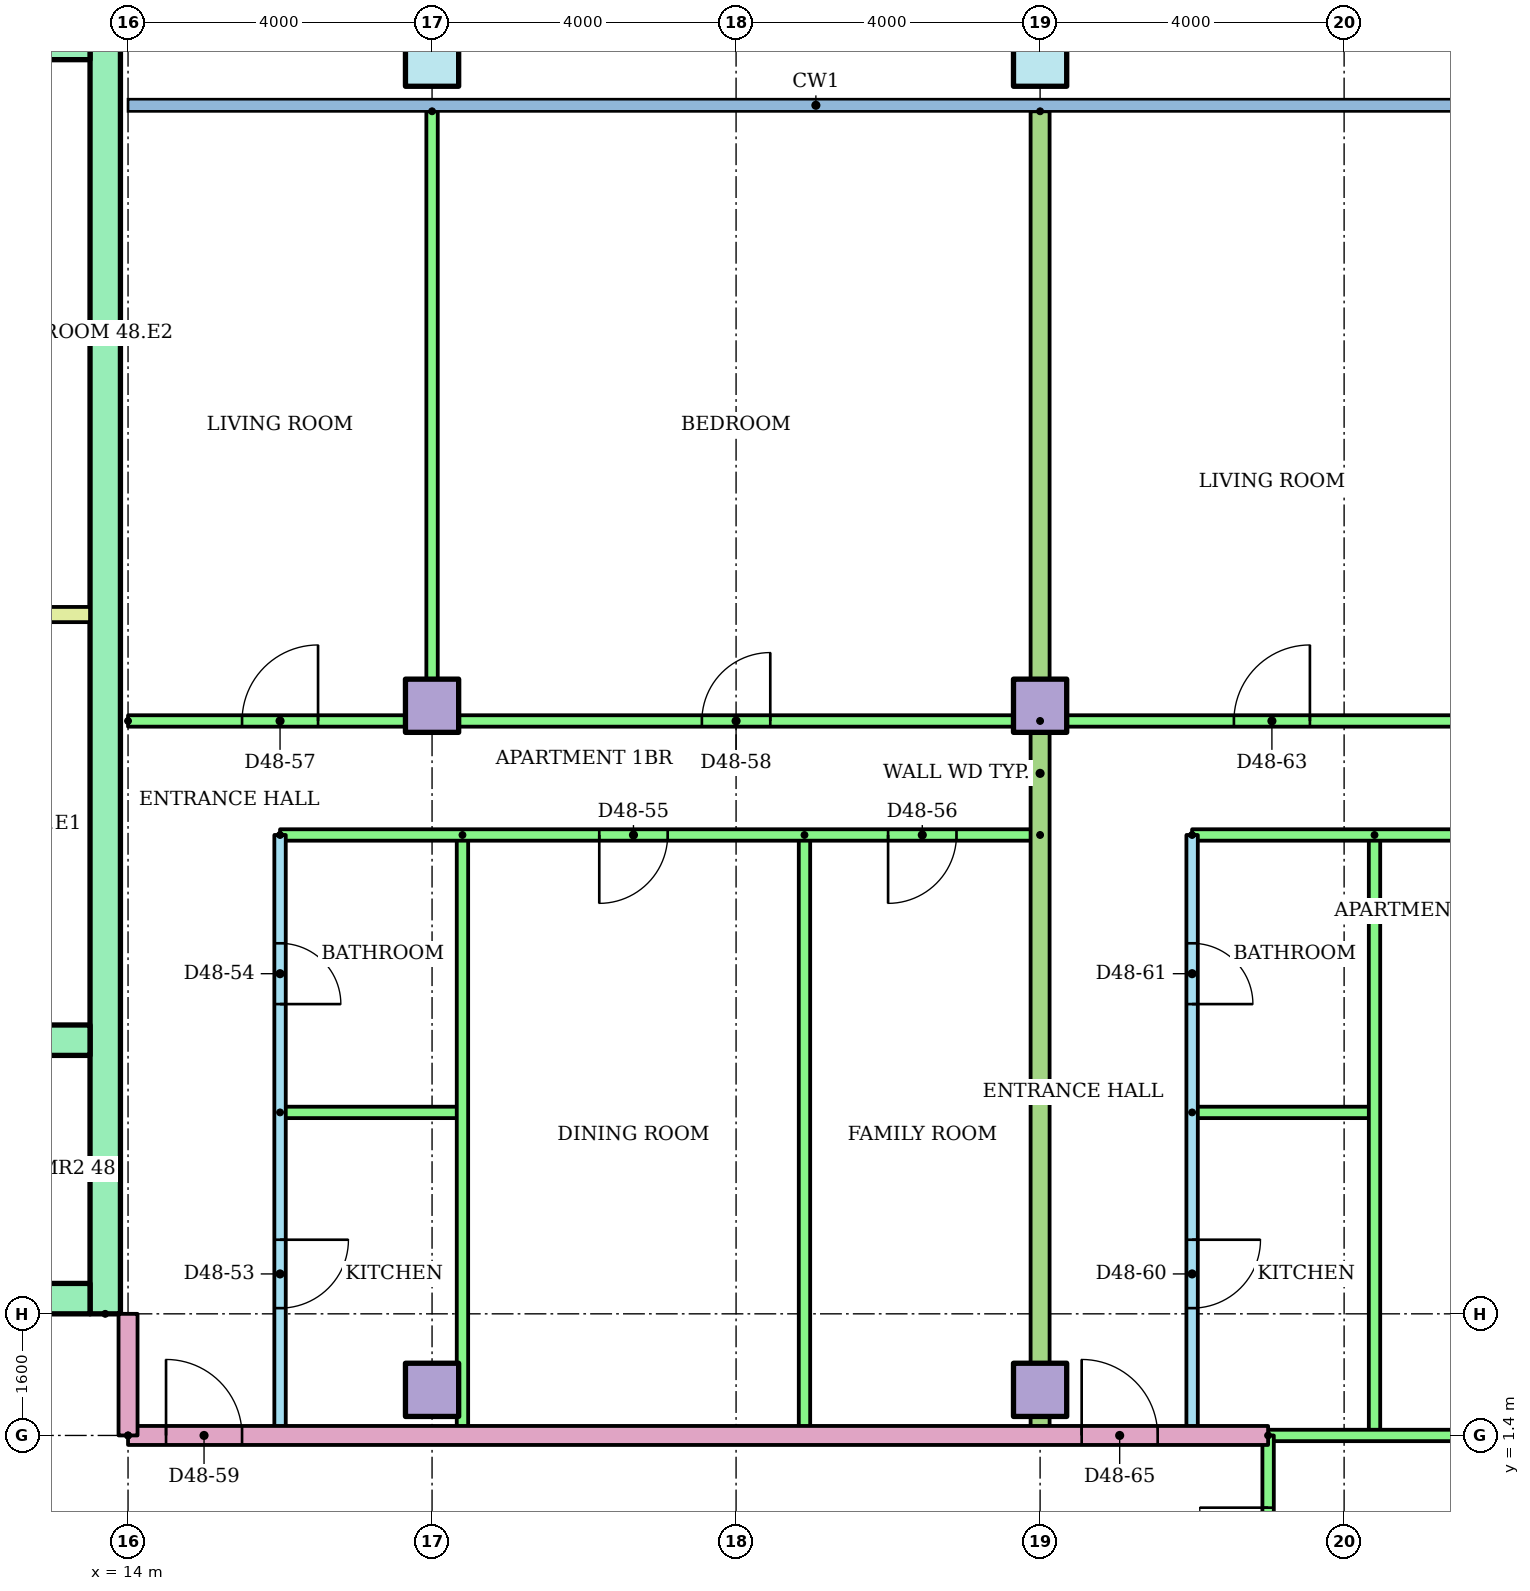
"""IFC4 building model, lengths in metres.
Left out: names, types, materials, properties, quantities, classifications, styles, units other than length and angle.
Written with IfcOpenShell. Run it as: python <this file> out.ifc"""

import sys

from ifc_helpers import new_model, si_unit, direction, frame, frame_2d, origin, origin_2d, place, context, subcontext, project, spatial, rectangle, hollow_rectangle, extrude, element, fill, save


model = new_model("IFC4")
c1 = context("Model", 3, precision=1e-05, world=origin(), true_north=direction((0.0, 1.0)))
c2 = subcontext(c1, "Body", "Model", "MODEL_VIEW")
j1 = project(units=[si_unit("LENGTHUNIT", "METRE"), si_unit("PLANEANGLEUNIT", "RADIAN")], contexts=[c1])
p1 = place(None, origin())
s1 = spatial("IfcSite", under=j1, at=p1, CompositionType="ELEMENT")
p2 = place(p1, origin())
s2 = spatial("IfcBuilding", under=s1, at=p2, CompositionType="ELEMENT")
p3 = place(p2, frame((0.0, 0.0, 184.5)))
s3 = spatial("IfcBuildingStorey", under=s2, at=p3, CompositionType="ELEMENT", Elevation=184.5)
for number, where in (
    (1, (18.0, 2.0, 0.0)),
    (2, (26.0, 2.0, 0.0)),
    (3, (18.0, 11.0, 0.0)),
    (4, (26.0, 11.0, 0.0)),
):
    element("IfcColumn", number, at=place(p3, frame(where)), inside=s3, PredefinedType="COLUMN", context=c2, shape_type="SweptSolid", body=[
        extrude(rectangle(XDim=0.7, YDim=0.7, at=origin_2d()), origin(), (0.0, 0.0, 1.0), 3.2),
    ])
for number, where in (
    (5, (18.0, 19.5, 0.0)),
    (6, (26.0, 19.5, 0.0)),
):
    element("IfcColumn", number, at=place(p3, frame(where)), inside=s3, PredefinedType="COLUMN", context=c2, shape_type="SweptSolid", body=[
        extrude(hollow_rectangle(XDim=0.7, YDim=0.7, WallThickness=0.036, at=origin_2d()), origin(), (0.0, 0.0, 1.0), 3.2),
    ])
p4 = place(p3, frame((13.7, 3.0, 0.0), z_axis=(0.0, 0.0, 1.0), x_axis=(0.0, 1.0, 0.0)))
e7 = element("IfcWall", 7, at=p4, inside=s3, PredefinedType="SHEAR", context=c2, shape_type="SweptSolid", body=[
    extrude(rectangle(XDim=17.0, YDim=0.4, at=frame_2d((8.5, 0.0))), origin(), (0.0, 0.0, 1.0), 2.92),
])
p5 = place(p3, frame((-13.5, 19.7, 0.0)))
e8 = element("IfcWall", 8, at=p5, inside=s3, PredefinedType="SHEAR", context=c2, shape_type="SweptSolid", body=[
    extrude(rectangle(XDim=27.0, YDim=0.4, at=frame_2d((13.5, 0.0))), origin(), (0.0, 0.0, 1.0), 2.92),
])
p6 = place(p3, frame((-13.5, 3.2, 0.0)))
e9 = element("IfcWall", 9, at=p6, inside=s3, PredefinedType="SHEAR", context=c2, shape_type="SweptSolid", body=[
    extrude(rectangle(XDim=27.0, YDim=0.4, at=frame_2d((13.5, 0.0))), origin(), (0.0, 0.0, 1.0), 2.92),
])
p7 = place(p6, frame((22.083, 0.0, 0.0)))
e10 = element("IfcOpeningElement", 10, at=p7, cuts=e9, PredefinedType="OPENING", context=c2, shape_type="SweptSolid", body=[
    extrude(rectangle(XDim=1.1, YDim=2.1, at=frame_2d((0.55, 1.05))), frame((0.0, 0.21, 0.0), z_axis=(0.0, -1.0, 0.0), x_axis=(1.0, 0.0, 0.0)), (0.0, 0.0, 1.0), 0.42),
])
p8 = place(p6, frame((25.128, 0.0, 0.0)))
e11 = element("IfcOpeningElement", 11, at=p8, cuts=e9, PredefinedType="OPENING", context=c2, shape_type="SweptSolid", body=[
    extrude(rectangle(XDim=1.1, YDim=2.1, at=frame_2d((0.55, 1.05))), frame((0.0, 0.21, 0.0), z_axis=(0.0, -1.0, 0.0), x_axis=(1.0, 0.0, 0.0)), (0.0, 0.0, 1.0), 0.42),
])
p9 = place(p6, frame((12.6, 0.0, 0.0)))
e12 = element("IfcOpeningElement", 12, at=p9, cuts=e9, PredefinedType="OPENING", context=c2, shape_type="SweptSolid", body=[
    extrude(rectangle(XDim=1.8, YDim=2.1, at=frame_2d((0.9, 1.05))), frame((0.0, 0.21, 0.0), z_axis=(0.0, -1.0, 0.0), x_axis=(1.0, 0.0, 0.0)), (0.0, 0.0, 1.0), 0.42),
])
p10 = place(p3, frame((1.522, 6.6, 0.0)))
e13 = element("IfcWall", 13, at=p10, inside=s3, PredefinedType="SHEAR", context=c2, shape_type="SweptSolid", body=[
    extrude(rectangle(XDim=11.978, YDim=0.4, at=frame_2d((5.989, 0.0))), origin(), (0.0, 0.0, 1.0), 2.92),
])
p11 = place(p10, frame((2.544, 0.0, 0.0)))
e14 = element("IfcOpeningElement", 14, at=p11, cuts=e13, PredefinedType="OPENING", context=c2, shape_type="SweptSolid", body=[
    extrude(rectangle(XDim=1.0, YDim=2.1, at=frame_2d((0.5, 1.05))), frame((0.0, 0.21, 0.0), z_axis=(0.0, -1.0, 0.0), x_axis=(1.0, 0.0, 0.0)), (0.0, 0.0, 1.0), 0.42),
])
p12 = place(p3, frame((9.6, 12.2, 0.0)))
e15 = element("IfcWall", 15, at=p12, inside=s3, PredefinedType="PARTITIONING", context=c2, shape_type="SweptSolid", body=[
    extrude(rectangle(XDim=3.9, YDim=0.2, at=frame_2d((1.95, 0.0))), origin(), (0.0, 0.0, 1.0), 2.92),
])
p13 = place(p3, frame((16.0, 9.3, 0.0), z_axis=(0.0, 0.0, 1.0), x_axis=(0.0, -1.0, 0.0)))
e16 = element("IfcWall", 16, at=p13, inside=s3, PredefinedType="PARTITIONING", context=c2, shape_type="SweptSolid", body=[
    extrude(rectangle(XDim=7.9, YDim=0.15, at=frame_2d((3.95, 0.0))), origin(), (0.0, 0.0, 1.0), 2.4),
])
p14 = place(p13, frame((5.325, 0.0, 0.0)))
e17 = element("IfcOpeningElement", 17, at=p14, cuts=e16, PredefinedType="OPENING", context=c2, shape_type="SweptSolid", body=[
    extrude(rectangle(XDim=0.9, YDim=2.1, at=frame_2d((0.45, 1.05))), frame((0.0, 0.085, 0.0), z_axis=(0.0, -1.0, 0.0), x_axis=(1.0, 0.0, 0.0)), (0.0, 0.0, 1.0), 0.17),
])
p15 = place(p13, frame((1.425, 0.0, 0.0)))
e18 = element("IfcOpeningElement", 18, at=p15, cuts=e16, PredefinedType="OPENING", context=c2, shape_type="SweptSolid", body=[
    extrude(rectangle(XDim=0.8, YDim=2.1, at=frame_2d((0.4, 1.05))), frame((0.0, 0.085, 0.0), z_axis=(0.0, -1.0, 0.0), x_axis=(1.0, 0.0, 0.0)), (0.0, 0.0, 1.0), 0.17),
])
p16 = place(p3, frame((16.0, 5.65, 0.0)))
e19 = element("IfcWall", 19, at=p16, inside=s3, PredefinedType="PARTITIONING", context=c2, shape_type="SweptSolid", body=[
    extrude(rectangle(XDim=2.4, YDim=0.15, at=frame_2d((1.2, 0.0))), origin(), (0.0, 0.0, 1.0), 2.4),
])
for number, where, z_axis, x_axis in (
    (20, (18.4, 9.3, 0.0), (0.0, 0.0, 1.0), (0.0, -1.0, 0.0)),
    (21, (22.9, 9.3, 0.0), (0.0, 0.0, 1.0), (0.0, -1.0, 0.0)),
):
    element("IfcWall", number, at=place(p3, frame(where, z_axis=z_axis, x_axis=x_axis)), inside=s3, PredefinedType="PARTITIONING", context=c2, shape_type="SweptSolid", body=[
        extrude(rectangle(XDim=7.9, YDim=0.15, at=frame_2d((3.95, 0.0))), origin(), (0.0, 0.0, 1.0), 2.4),
    ])
p17 = place(p3, frame((26.0, 9.3, 0.0), z_axis=(0.0, 0.0, 1.0), x_axis=(-1.0, 0.0, 0.0)))
e22 = element("IfcWall", 22, at=p17, inside=s3, PredefinedType="PARTITIONING", context=c2, shape_type="SweptSolid", body=[
    extrude(rectangle(XDim=10.0, YDim=0.15, at=frame_2d((5.0, 0.0))), origin(), (0.0, 0.0, 1.0), 2.4),
])
p18 = place(p17, frame((4.9, 0.0, 0.0)))
e23 = element("IfcOpeningElement", 23, at=p18, cuts=e22, PredefinedType="OPENING", context=c2, shape_type="SweptSolid", body=[
    extrude(rectangle(XDim=0.9, YDim=2.1, at=frame_2d((0.45, 1.05))), frame((0.0, 0.085, 0.0), z_axis=(0.0, -1.0, 0.0), x_axis=(1.0, 0.0, 0.0)), (0.0, 0.0, 1.0), 0.17),
])
p19 = place(p17, frame((1.1, 0.0, 0.0)))
e24 = element("IfcOpeningElement", 24, at=p19, cuts=e22, PredefinedType="OPENING", context=c2, shape_type="SweptSolid", body=[
    extrude(rectangle(XDim=0.9, YDim=2.1, at=frame_2d((0.45, 1.05))), frame((0.0, 0.085, 0.0), z_axis=(0.0, -1.0, 0.0), x_axis=(1.0, 0.0, 0.0)), (0.0, 0.0, 1.0), 0.17),
])
p20 = place(p3, frame((14.0, 10.8, 0.0)))
e25 = element("IfcWall", 25, at=p20, inside=s3, PredefinedType="PARTITIONING", context=c2, shape_type="SweptSolid", body=[
    extrude(rectangle(XDim=12.0, YDim=0.15, at=frame_2d((6.0, 0.0))), origin(), (0.0, 0.0, 1.0), 2.4),
])
p21 = place(p20, frame((1.5, 0.0, 0.0)))
e26 = element("IfcOpeningElement", 26, at=p21, cuts=e25, PredefinedType="OPENING", context=c2, shape_type="SweptSolid", body=[
    extrude(rectangle(XDim=1.0, YDim=2.1, at=frame_2d((0.5, 1.05))), frame((0.0, 0.085, 0.0), z_axis=(0.0, -1.0, 0.0), x_axis=(1.0, 0.0, 0.0)), (0.0, 0.0, 1.0), 0.17),
])
p22 = place(p20, frame((7.55, 0.0, 0.0)))
e27 = element("IfcOpeningElement", 27, at=p22, cuts=e25, PredefinedType="OPENING", context=c2, shape_type="SweptSolid", body=[
    extrude(rectangle(XDim=0.9, YDim=2.1, at=frame_2d((0.45, 1.05))), frame((0.0, 0.085, 0.0), z_axis=(0.0, -1.0, 0.0), x_axis=(1.0, 0.0, 0.0)), (0.0, 0.0, 1.0), 0.17),
])
p23 = place(p3, frame((18.0, 18.821, 0.0), z_axis=(0.0, 0.0, 1.0), x_axis=(0.0, -1.0, 0.0)))
e28 = element("IfcWall", 28, at=p23, inside=s3, PredefinedType="PARTITIONING", context=c2, shape_type="SweptSolid", body=[
    extrude(rectangle(XDim=8.021, YDim=0.15, at=frame_2d((4.01, 0.0))), origin(), (0.0, 0.0, 1.0), 2.4),
])
p24 = place(p3, frame((28.0, 9.3, 0.0), z_axis=(0.0, 0.0, 1.0), x_axis=(0.0, -1.0, 0.0)))
e29 = element("IfcWall", 29, at=p24, inside=s3, PredefinedType="PARTITIONING", context=c2, shape_type="SweptSolid", body=[
    extrude(rectangle(XDim=7.9, YDim=0.15, at=frame_2d((3.95, 0.0))), origin(), (0.0, 0.0, 1.0), 2.4),
])
p25 = place(p24, frame((5.325, 0.0, 0.0)))
e30 = element("IfcOpeningElement", 30, at=p25, cuts=e29, PredefinedType="OPENING", context=c2, shape_type="SweptSolid", body=[
    extrude(rectangle(XDim=0.9, YDim=2.1, at=frame_2d((0.45, 1.05))), frame((0.0, 0.085, 0.0), z_axis=(0.0, -1.0, 0.0), x_axis=(1.0, 0.0, 0.0)), (0.0, 0.0, 1.0), 0.17),
])
p26 = place(p24, frame((1.425, 0.0, 0.0)))
e31 = element("IfcOpeningElement", 31, at=p26, cuts=e29, PredefinedType="OPENING", context=c2, shape_type="SweptSolid", body=[
    extrude(rectangle(XDim=0.8, YDim=2.1, at=frame_2d((0.4, 1.05))), frame((0.0, 0.085, 0.0), z_axis=(0.0, -1.0, 0.0), x_axis=(1.0, 0.0, 0.0)), (0.0, 0.0, 1.0), 0.17),
])
p27 = place(p3, frame((28.0, 5.65, 0.0)))
e32 = element("IfcWall", 32, at=p27, inside=s3, PredefinedType="PARTITIONING", context=c2, shape_type="SweptSolid", body=[
    extrude(rectangle(XDim=2.4, YDim=0.15, at=frame_2d((1.2, 0.0))), origin(), (0.0, 0.0, 1.0), 2.4),
])
p28 = place(p3, frame((30.4, 9.3, 0.0), z_axis=(0.0, 0.0, 1.0), x_axis=(0.0, -1.0, 0.0)))
e33 = element("IfcWall", 33, at=p28, inside=s3, PredefinedType="PARTITIONING", context=c2, shape_type="SweptSolid", body=[
    extrude(rectangle(XDim=7.9, YDim=0.15, at=frame_2d((3.95, 0.0))), origin(), (0.0, 0.0, 1.0), 2.4),
])
p29 = place(p3, frame((36.81, 9.3, 0.0), z_axis=(0.0, 0.0, 1.0), x_axis=(-1.0, 0.0, 0.0)))
e34 = element("IfcWall", 34, at=p29, inside=s3, PredefinedType="PARTITIONING", context=c2, shape_type="SweptSolid", body=[
    extrude(rectangle(XDim=8.81, YDim=0.15, at=frame_2d((4.405, 0.0))), origin(), (0.0, 0.0, 1.0), 2.4),
])
p30 = place(p29, frame((3.357, 0.0, 0.0)))
e35 = element("IfcOpeningElement", 35, at=p30, cuts=e34, PredefinedType="OPENING", context=c2, shape_type="SweptSolid", body=[
    extrude(rectangle(XDim=0.9, YDim=2.1, at=frame_2d((0.45, 1.05))), frame((0.0, 0.085, 0.0), z_axis=(0.0, -1.0, 0.0), x_axis=(1.0, 0.0, 0.0)), (0.0, 0.0, 1.0), 0.17),
])
p31 = place(p3, frame((26.0, 10.8, 0.0)))
e36 = element("IfcWall", 36, at=p31, inside=s3, PredefinedType="PARTITIONING", context=c2, shape_type="SweptSolid", body=[
    extrude(rectangle(XDim=10.81, YDim=0.15, at=frame_2d((5.405, 0.0))), origin(), (0.0, 0.0, 1.0), 2.4),
])
p32 = place(p31, frame((2.55, 0.0, 0.0)))
e37 = element("IfcOpeningElement", 37, at=p32, cuts=e36, PredefinedType="OPENING", context=c2, shape_type="SweptSolid", body=[
    extrude(rectangle(XDim=1.0, YDim=2.1, at=frame_2d((0.5, 1.05))), frame((0.0, 0.085, 0.0), z_axis=(0.0, -1.0, 0.0), x_axis=(1.0, 0.0, 0.0)), (0.0, 0.0, 1.0), 0.17),
])
p33 = place(p31, frame((8.547, 0.0, 0.0)))
e38 = element("IfcOpeningElement", 38, at=p33, cuts=e36, PredefinedType="OPENING", context=c2, shape_type="SweptSolid", body=[
    extrude(rectangle(XDim=1.0, YDim=2.1, at=frame_2d((0.5, 1.05))), frame((0.0, 0.085, 0.0), z_axis=(0.0, -1.0, 0.0), x_axis=(1.0, 0.0, 0.0)), (0.0, 0.0, 1.0), 0.17),
])
p34 = place(p3, frame((26.0, 18.821, 0.0), z_axis=(0.0, 0.0, 1.0), x_axis=(0.0, -1.0, 0.0)))
e39 = element("IfcWall", 39, at=p34, inside=s3, PredefinedType="PARTITIONING", context=c2, shape_type="SweptSolid", body=[
    extrude(rectangle(XDim=17.421, YDim=0.25, at=frame_2d((8.71, 0.0))), origin(), (0.0, 0.0, 1.0), 2.4),
])
p35 = place(p3, frame((14.0, 1.4, 0.0)))
e40 = element("IfcWall", 40, at=p35, inside=s3, PredefinedType="PARTITIONING", context=c2, shape_type="SweptSolid", body=[
    extrude(rectangle(XDim=15.0, YDim=0.25, at=frame_2d((7.5, 0.0))), origin(), (0.0, 0.0, 1.0), 2.4),
])
p36 = place(p35, frame((0.5, 0.0, 0.0)))
e41 = element("IfcOpeningElement", 41, at=p36, cuts=e40, PredefinedType="OPENING", context=c2, shape_type="SweptSolid", body=[
    extrude(rectangle(XDim=1.0, YDim=2.1, at=frame_2d((0.5, 1.05))), frame((0.0, 0.135, 0.0), z_axis=(0.0, -1.0, 0.0), x_axis=(1.0, 0.0, 0.0)), (0.0, 0.0, 1.0), 0.27),
])
p37 = place(p35, frame((12.547, 0.0, 0.0)))
e42 = element("IfcOpeningElement", 42, at=p37, cuts=e40, PredefinedType="OPENING", context=c2, shape_type="SweptSolid", body=[
    extrude(rectangle(XDim=1.0, YDim=2.1, at=frame_2d((0.5, 1.05))), frame((0.0, 0.135, 0.0), z_axis=(0.0, -1.0, 0.0), x_axis=(1.0, 0.0, 0.0)), (0.0, 0.0, 1.0), 0.27),
])
p38 = place(p3, frame((29.0, 1.4, 0.0)))
e43 = element("IfcWall", 43, at=p38, inside=s3, PredefinedType="PARTITIONING", context=c2, shape_type="SweptSolid", body=[
    extrude(rectangle(XDim=7.82, YDim=0.15, at=frame_2d((3.91, 0.0))), origin(), (0.0, 0.0, 1.0), 2.4),
])
p39 = place(p3, frame((29.0, -1.4, 0.0), z_axis=(0.0, 0.0, 1.0), x_axis=(0.0, 1.0, 0.0)))
e44 = element("IfcWall", 44, at=p39, inside=s3, PredefinedType="PARTITIONING", context=c2, shape_type="SweptSolid", body=[
    extrude(rectangle(XDim=2.8, YDim=0.15, at=frame_2d((1.4, 0.0))), origin(), (0.0, 0.0, 1.0), 2.4),
])
p40 = place(p39, frame((0.95, 0.0, 0.0)))
e45 = element("IfcOpeningElement", 45, at=p40, cuts=e44, PredefinedType="OPENING", context=c2, shape_type="SweptSolid", body=[
    extrude(rectangle(XDim=0.9, YDim=2.1, at=frame_2d((0.45, 1.05))), frame((0.0, 0.085, 0.0), z_axis=(0.0, -1.0, 0.0), x_axis=(1.0, 0.0, 0.0)), (0.0, 0.0, 1.0), 0.17),
])
p41 = place(p3, frame((14.0, 1.4, 0.0), z_axis=(0.0, 0.0, 1.0), x_axis=(0.0, 1.0, 0.0)))
e46 = element("IfcWall", 46, at=p41, inside=s3, PredefinedType="PARTITIONING", context=c2, shape_type="SweptSolid", body=[
    extrude(rectangle(XDim=1.6, YDim=0.25, at=frame_2d((0.8, 0.0))), origin(), (0.0, 0.0, 1.0), 2.4),
])
p42 = place(p14, origin())
e47 = element("IfcDoor", 47, at=p42, inside=s3, OperationType="SINGLE_SWING_LEFT", PredefinedType="DOOR", context=c2, shape_type="SweptSolid", body=[
    extrude(rectangle(XDim=0.9, YDim=2.1, at=frame_2d((0.45, 1.05))), frame((0.0, 0.025, 0.0), z_axis=(0.0, -1.0, 0.0), x_axis=(1.0, 0.0, 0.0)), (0.0, 0.0, 1.0), 0.05),
])
fill(e17, e47)
p43 = place(p15, origin())
e48 = element("IfcDoor", 48, at=p43, inside=s3, OperationType="SINGLE_SWING_RIGHT", PredefinedType="DOOR", context=c2, shape_type="SweptSolid", body=[
    extrude(rectangle(XDim=0.8, YDim=2.1, at=frame_2d((0.4, 1.05))), frame((0.0, 0.025, 0.0), z_axis=(0.0, -1.0, 0.0), x_axis=(1.0, 0.0, 0.0)), (0.0, 0.0, 1.0), 0.05),
])
fill(e18, e48)
p44 = place(p18, origin())
e49 = element("IfcDoor", 49, at=p44, inside=s3, OperationType="SINGLE_SWING_RIGHT", PredefinedType="DOOR", context=c2, shape_type="SweptSolid", body=[
    extrude(rectangle(XDim=0.9, YDim=2.1, at=frame_2d((0.45, 1.05))), frame((0.0, 0.025, 0.0), z_axis=(0.0, -1.0, 0.0), x_axis=(1.0, 0.0, 0.0)), (0.0, 0.0, 1.0), 0.05),
])
fill(e23, e49)
p45 = place(p19, origin())
e50 = element("IfcDoor", 50, at=p45, inside=s3, OperationType="SINGLE_SWING_RIGHT", PredefinedType="DOOR", context=c2, shape_type="SweptSolid", body=[
    extrude(rectangle(XDim=0.9, YDim=2.1, at=frame_2d((0.45, 1.05))), frame((0.0, 0.025, 0.0), z_axis=(0.0, -1.0, 0.0), x_axis=(1.0, 0.0, 0.0)), (0.0, 0.0, 1.0), 0.05),
])
fill(e24, e50)
p46 = place(p21, origin())
e51 = element("IfcDoor", 51, at=p46, inside=s3, OperationType="SINGLE_SWING_RIGHT", PredefinedType="DOOR", context=c2, shape_type="SweptSolid", body=[
    extrude(rectangle(XDim=1.0, YDim=2.1, at=frame_2d((0.5, 1.05))), frame((0.0, 0.025, 0.0), z_axis=(0.0, -1.0, 0.0), x_axis=(1.0, 0.0, 0.0)), (0.0, 0.0, 1.0), 0.05),
])
fill(e26, e51)
p47 = place(p22, origin())
e52 = element("IfcDoor", 52, at=p47, inside=s3, OperationType="SINGLE_SWING_RIGHT", PredefinedType="DOOR", context=c2, shape_type="SweptSolid", body=[
    extrude(rectangle(XDim=0.9, YDim=2.1, at=frame_2d((0.45, 1.05))), frame((0.0, 0.025, 0.0), z_axis=(0.0, -1.0, 0.0), x_axis=(1.0, 0.0, 0.0)), (0.0, 0.0, 1.0), 0.05),
])
fill(e27, e52)
p48 = place(p36, origin())
e53 = element("IfcDoor", 53, at=p48, inside=s3, OperationType="SINGLE_SWING_LEFT", PredefinedType="DOOR", context=c2, shape_type="SweptSolid", body=[
    extrude(rectangle(XDim=1.0, YDim=2.1, at=frame_2d((0.5, 1.05))), frame((0.0, 0.025, 0.0), z_axis=(0.0, -1.0, 0.0), x_axis=(1.0, 0.0, 0.0)), (0.0, 0.0, 1.0), 0.05),
])
fill(e41, e53)
p49 = place(p25, origin())
e54 = element("IfcDoor", 54, at=p49, inside=s3, OperationType="SINGLE_SWING_LEFT", PredefinedType="DOOR", context=c2, shape_type="SweptSolid", body=[
    extrude(rectangle(XDim=0.9, YDim=2.1, at=frame_2d((0.45, 1.05))), frame((0.0, 0.025, 0.0), z_axis=(0.0, -1.0, 0.0), x_axis=(1.0, 0.0, 0.0)), (0.0, 0.0, 1.0), 0.05),
])
fill(e30, e54)
p50 = place(p26, origin())
e55 = element("IfcDoor", 55, at=p50, inside=s3, OperationType="SINGLE_SWING_RIGHT", PredefinedType="DOOR", context=c2, shape_type="SweptSolid", body=[
    extrude(rectangle(XDim=0.8, YDim=2.1, at=frame_2d((0.4, 1.05))), frame((0.0, 0.025, 0.0), z_axis=(0.0, -1.0, 0.0), x_axis=(1.0, 0.0, 0.0)), (0.0, 0.0, 1.0), 0.05),
])
fill(e31, e55)
p51 = place(p32, origin())
e56 = element("IfcDoor", 56, at=p51, inside=s3, OperationType="SINGLE_SWING_RIGHT", PredefinedType="DOOR", context=c2, shape_type="SweptSolid", body=[
    extrude(rectangle(XDim=1.0, YDim=2.1, at=frame_2d((0.5, 1.05))), frame((0.0, 0.025, 0.0), z_axis=(0.0, -1.0, 0.0), x_axis=(1.0, 0.0, 0.0)), (0.0, 0.0, 1.0), 0.05),
])
fill(e37, e56)
p52 = place(p37, origin())
e57 = element("IfcDoor", 57, at=p52, inside=s3, OperationType="SINGLE_SWING_LEFT", PredefinedType="DOOR", context=c2, shape_type="SweptSolid", body=[
    extrude(rectangle(XDim=1.0, YDim=2.1, at=frame_2d((0.5, 1.05))), frame((0.0, 0.025, 0.0), z_axis=(0.0, -1.0, 0.0), x_axis=(1.0, 0.0, 0.0)), (0.0, 0.0, 1.0), 0.05),
])
fill(e42, e57)
p53 = place(p40, origin())
e58 = element("IfcDoor", 58, at=p53, inside=s3, OperationType="SINGLE_SWING_RIGHT", PredefinedType="DOOR", context=c2, shape_type="SweptSolid", body=[
    extrude(rectangle(XDim=0.9, YDim=2.1, at=frame_2d((0.45, 1.05))), frame((0.0, 0.025, 0.0), z_axis=(0.0, -1.0, 0.0), x_axis=(1.0, 0.0, 0.0)), (0.0, 0.0, 1.0), 0.05),
])
fill(e45, e58)
save(model, sys.argv[1])
